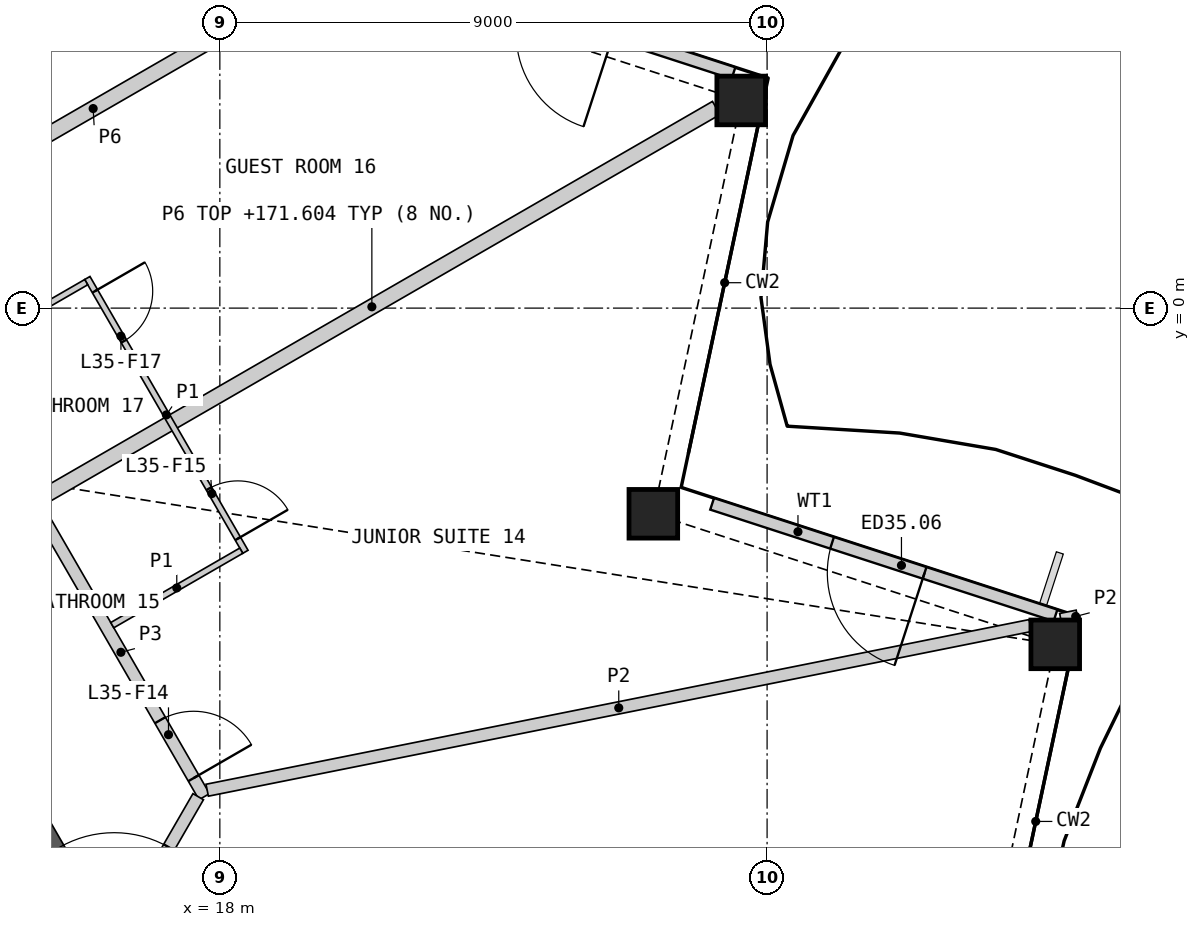
"""IFC4 building model, lengths in metres.
Left out: names, types, materials, properties, quantities, classifications, styles, units other than length and angle.
Written with IfcOpenShell. Run it as: python <this file> out.ifc"""

import sys

from ifc_helpers import new_model, si_unit, direction, frame, frame_2d, origin, origin_2d, place, context, subcontext, project, spatial, polyline, rectangle, hollow_rectangle, outline, extrude, element, fill, save


model = new_model("IFC4")
c1 = context("Model", 3, precision=1e-05, world=origin(), true_north=direction((0.0, 1.0)))
c2 = subcontext(c1, "Body", "Model", "MODEL_VIEW")
j1 = project(units=[si_unit("LENGTHUNIT", "METRE"), si_unit("PLANEANGLEUNIT", "RADIAN")], contexts=[c1])
p1 = place(None, origin())
s1 = spatial("IfcSite", under=j1, at=p1, CompositionType="ELEMENT")
p2 = place(p1, origin())
s2 = spatial("IfcBuilding", under=s1, at=p2, CompositionType="ELEMENT")
p3 = place(p2, frame((0.0, 0.0, 169.2)))
s3 = spatial("IfcBuildingStorey", under=s2, at=p3, CompositionType="ELEMENT", Elevation=169.2)
for number, where, z_axis, x_axis in (
    (1, (31.739, -5.53, 0.0), (0.0, 0.0, 1.0), (1.0, 0.0, 0.0)),
    (2, (25.129, -3.383, 0.0), (0.0, 0.0, 1.0), (1.0, 0.0, 0.0)),
    (3, (26.574, 3.415, 0.0), (0.0, 0.0, 1.0), (1.0, 0.0, 0.0)),
):
    element("IfcColumn", number, at=place(p3, frame(where, z_axis=z_axis, x_axis=x_axis)), inside=s3, PredefinedType="COLUMN", context=c2, shape_type="SweptSolid", body=[
        extrude(hollow_rectangle(XDim=0.8, YDim=0.8, WallThickness=0.05, at=origin_2d()), origin(), (0.0, 0.0, 1.0), 3.6),
    ])
p4 = place(p3, frame((31.743, -5.054, 0.0), z_axis=(0.0, 0.0, 1.0), x_axis=(-0.951061260164, 0.309002393867, 0.0)))
e4 = element("IfcWall", 4, at=p4, inside=s3, PredefinedType="SOLIDWALL", context=c2, shape_type="SweptSolid", body=[
    extrude(rectangle(XDim=5.938, YDim=0.2, at=frame_2d((2.969, 0.0))), origin(), (0.0, 0.0, 1.0), 2.701),
])
p5 = place(p4, frame((2.264, 0.0, 0.0)))
e5 = element("IfcOpeningElement", 5, at=p5, cuts=e4, PredefinedType="OPENING", context=c2, shape_type="SweptSolid", body=[
    extrude(rectangle(XDim=1.6, YDim=2.4, at=frame_2d((0.8, 1.2))), frame((0.0, 0.11, 0.0), z_axis=(0.0, -1.0, 0.0), x_axis=(1.0, 0.0, 0.0)), (0.0, 0.0, 1.0), 0.22),
])
p6 = place(p3, frame((26.447, 3.865, 0.0), z_axis=(0.0, 0.0, 1.0), x_axis=(-0.951043432761, 0.309057258453, 0.0)))
e6 = element("IfcWall", 6, at=p6, inside=s3, PredefinedType="SOLIDWALL", context=c2, shape_type="SweptSolid", body=[
    extrude(rectangle(XDim=5.748, YDim=0.2, at=frame_2d((2.874, 0.0))), origin(), (0.0, 0.0, 1.0), 2.701),
])
p7 = place(p6, frame((2.074, 0.0, 0.0)))
e7 = element("IfcOpeningElement", 7, at=p7, cuts=e6, PredefinedType="OPENING", context=c2, shape_type="SweptSolid", body=[
    extrude(rectangle(XDim=1.6, YDim=2.4, at=frame_2d((0.8, 1.2))), frame((0.0, 0.11, 0.0), z_axis=(0.0, -1.0, 0.0), x_axis=(1.0, 0.0, 0.0)), (0.0, 0.0, 1.0), 0.22),
])
p8 = place(p3, origin())
e8 = element("IfcWall", 8, at=p8, inside=s3, PredefinedType="SHEAR", context=c2, shape_type="SweptSolid", body=[
    extrude(outline(polyline([(14.201, -8.949), (14.201, -8.199), (14.851, -7.824), (15.5, -8.949), (14.201, -8.949)])), origin(), (0.0, 0.0, 1.0), 3.25),
])
p9 = place(p3, frame((14.836, -3.249, 0.0), z_axis=(0.0, 0.0, 1.0), x_axis=(0.866022412254, 0.500005181446, 0.0)))
e9 = element("IfcWall", 9, at=p9, inside=s3, PredefinedType="PARTITIONING", context=c2, shape_type="SweptSolid", body=[
    extrude(rectangle(XDim=13.081, YDim=0.25, at=frame_2d((6.541, 0.0))), origin(), (0.0, 0.0, 1.0), 2.404),
])
p10 = place(p3, frame((12.278, 1.182, 0.0), z_axis=(0.0, 0.0, 1.0), x_axis=(0.866024457297, 0.500001639361, 0.0)))
e10 = element("IfcWall", 10, at=p10, inside=s3, PredefinedType="PARTITIONING", context=c2, shape_type="SweptSolid", body=[
    extrude(rectangle(XDim=8.402, YDim=0.25, at=frame_2d((4.201, 0.0))), origin(), (0.0, 0.0, 1.0), 2.404),
])
p11 = place(p3, frame((15.002, -3.286, 0.0), z_axis=(0.0, 0.0, 1.0), x_axis=(0.500007607708, -0.866021011428, 0.0)))
e11 = element("IfcWall", 11, at=p11, inside=s3, PredefinedType="PARTITIONING", context=c2, shape_type="SweptSolid", body=[
    extrude(rectangle(XDim=5.484, YDim=0.2, at=frame_2d((2.742, 0.0))), origin(), (0.0, 0.0, 1.0), 3.25),
])
p12 = place(p11, frame((4.032, 0.0, 0.0)))
e12 = element("IfcOpeningElement", 12, at=p12, cuts=e11, PredefinedType="OPENING", context=c2, shape_type="SweptSolid", body=[
    extrude(rectangle(XDim=1.1, YDim=2.1, at=frame_2d((0.55, 1.05))), frame((0.0, 0.11, 0.0), z_axis=(0.0, -1.0, 0.0), x_axis=(1.0, 0.0, 0.0)), (0.0, 0.0, 1.0), 0.22),
])
p13 = place(p3, frame((15.731, -11.349, 0.0), z_axis=(0.0, 0.0, 1.0), x_axis=(0.499961815444, 0.866047448526, 0.0)))
e13 = element("IfcWall", 13, at=p13, inside=s3, PredefinedType="PARTITIONING", context=c2, shape_type="SweptSolid", body=[
    extrude(rectangle(XDim=3.826, YDim=0.2, at=frame_2d((1.913, 0.0))), origin(), (0.0, 0.0, 1.0), 3.25),
])
p14 = place(p13, frame((1.064, 0.0, 0.0)))
e14 = element("IfcOpeningElement", 14, at=p14, cuts=e13, PredefinedType="OPENING", context=c2, shape_type="SweptSolid", body=[
    extrude(rectangle(XDim=1.8, YDim=2.1, at=frame_2d((0.9, 1.05))), frame((0.0, 0.11, 0.0), z_axis=(0.0, -1.0, 0.0), x_axis=(1.0, 0.0, 0.0)), (0.0, 0.0, 1.0), 0.22),
])
p15 = place(p3, frame((17.792, -7.929, 0.0), z_axis=(0.0, 0.0, 1.0), x_axis=(0.980565709097, 0.196190953266, 0.0)))
e15 = element("IfcWall", 15, at=p15, inside=s3, PredefinedType="PARTITIONING", context=c2, shape_type="SweptSolid", body=[
    extrude(rectangle(XDim=13.805, YDim=0.2, at=frame_2d((6.903, 0.0))), origin(), (0.0, 0.0, 1.0), 2.404),
])
p16 = place(p3, frame((31.831, -5.12, 0.0), z_axis=(0.0, 0.0, 1.0), x_axis=(0.980512850695, 0.19645495571, 0.0)))
e16 = element("IfcWall", 16, at=p16, inside=s3, PredefinedType="PARTITIONING", context=c2, shape_type="SweptSolid", body=[
    extrude(rectangle(XDim=0.277, YDim=0.2, at=frame_2d((0.139, 0.0))), origin(), (0.0, 0.0, 1.0), 2.404),
])
p17 = place(p3, frame((15.821, 0.495, 0.0), z_axis=(0.0, 0.0, 1.0), x_axis=(0.500006934395, -0.866021400173, 0.0)))
e17 = element("IfcWall", 17, at=p17, inside=s3, PredefinedType="PARTITIONING", context=c2, shape_type="SweptSolid", body=[
    extrude(rectangle(XDim=5.2, YDim=0.1, at=frame_2d((2.6, 0.0))), origin(), (0.0, 0.0, 1.0), 2.404),
])
p18 = place(p17, frame((4.0, 0.0, 0.0)))
e18 = element("IfcOpeningElement", 18, at=p18, cuts=e17, PredefinedType="OPENING", context=c2, shape_type="SweptSolid", body=[
    extrude(rectangle(XDim=0.95, YDim=2.1, at=frame_2d((0.475, 1.05))), frame((0.0, 0.06, 0.0), z_axis=(0.0, -1.0, 0.0), x_axis=(1.0, 0.0, 0.0)), (0.0, 0.0, 1.0), 0.12),
])
p19 = place(p17, frame((0.25, 0.0, 0.0)))
e19 = element("IfcOpeningElement", 19, at=p19, cuts=e17, PredefinedType="OPENING", context=c2, shape_type="SweptSolid", body=[
    extrude(rectangle(XDim=0.95, YDim=2.1, at=frame_2d((0.475, 1.05))), frame((0.0, 0.06, 0.0), z_axis=(0.0, -1.0, 0.0), x_axis=(1.0, 0.0, 0.0)), (0.0, 0.0, 1.0), 0.12),
])
p20 = place(p3, frame((16.231, -5.215, 0.0), z_axis=(0.0, 0.0, 1.0), x_axis=(0.866057815567, 0.499943856944, 0.0)))
e20 = element("IfcWall", 20, at=p20, inside=s3, PredefinedType="PARTITIONING", context=c2, shape_type="SweptSolid", body=[
    extrude(rectangle(XDim=2.45, YDim=0.1, at=frame_2d((1.225, 0.0))), origin(), (0.0, 0.0, 1.0), 2.404),
])
p21 = place(p3, frame((13.681, -0.798, 0.0), z_axis=(0.0, 0.0, 1.0), x_axis=(0.866032905446, 0.499987006516, 0.0)))
e21 = element("IfcWall", 21, at=p21, inside=s3, PredefinedType="PARTITIONING", context=c2, shape_type="SweptSolid", body=[
    extrude(rectangle(XDim=2.45, YDim=0.1, at=frame_2d((1.225, 0.0))), origin(), (0.0, 0.0, 1.0), 2.404),
])
p22 = place(p5, origin())
e22 = element("IfcDoor", 22, at=p22, inside=s3, OperationType="DOUBLE_DOOR_SINGLE_SWING", PredefinedType="DOOR", context=c2, shape_type="SweptSolid", body=[
    extrude(rectangle(XDim=1.6, YDim=2.4, at=frame_2d((0.8, 1.2))), frame((0.0, 0.025, 0.0), z_axis=(0.0, -1.0, 0.0), x_axis=(1.0, 0.0, 0.0)), (0.0, 0.0, 1.0), 0.05),
])
fill(e5, e22)
p23 = place(p14, origin())
e23 = element("IfcDoor", 23, at=p23, inside=s3, OperationType="DOUBLE_DOOR_SINGLE_SWING", PredefinedType="DOOR", context=c2, shape_type="SweptSolid", body=[
    extrude(rectangle(XDim=1.8, YDim=2.1, at=frame_2d((0.9, 1.05))), frame((0.0, 0.025, 0.0), z_axis=(0.0, -1.0, 0.0), x_axis=(1.0, 0.0, 0.0)), (0.0, 0.0, 1.0), 0.05),
])
fill(e14, e23)
p24 = place(p12, origin())
e24 = element("IfcDoor", 24, at=p24, inside=s3, OperationType="SINGLE_SWING_RIGHT", PredefinedType="DOOR", context=c2, shape_type="SweptSolid", body=[
    extrude(rectangle(XDim=1.1, YDim=2.1, at=frame_2d((0.55, 1.05))), frame((0.0, 0.025, 0.0), z_axis=(0.0, -1.0, 0.0), x_axis=(1.0, 0.0, 0.0)), (0.0, 0.0, 1.0), 0.05),
])
fill(e12, e24)
p25 = place(p18, origin())
e25 = element("IfcDoor", 25, at=p25, inside=s3, OperationType="SINGLE_SWING_RIGHT", PredefinedType="DOOR", context=c2, shape_type="SweptSolid", body=[
    extrude(rectangle(XDim=0.95, YDim=2.1, at=frame_2d((0.475, 1.05))), frame((0.0, 0.025, 0.0), z_axis=(0.0, -1.0, 0.0), x_axis=(1.0, 0.0, 0.0)), (0.0, 0.0, 1.0), 0.05),
])
fill(e18, e25)
p26 = place(p19, origin())
e26 = element("IfcDoor", 26, at=p26, inside=s3, OperationType="SINGLE_SWING_LEFT", PredefinedType="DOOR", context=c2, shape_type="SweptSolid", body=[
    extrude(rectangle(XDim=0.95, YDim=2.1, at=frame_2d((0.475, 1.05))), frame((0.0, 0.025, 0.0), z_axis=(0.0, -1.0, 0.0), x_axis=(1.0, 0.0, 0.0)), (0.0, 0.0, 1.0), 0.05),
])
fill(e19, e26)
save(model, sys.argv[1])
